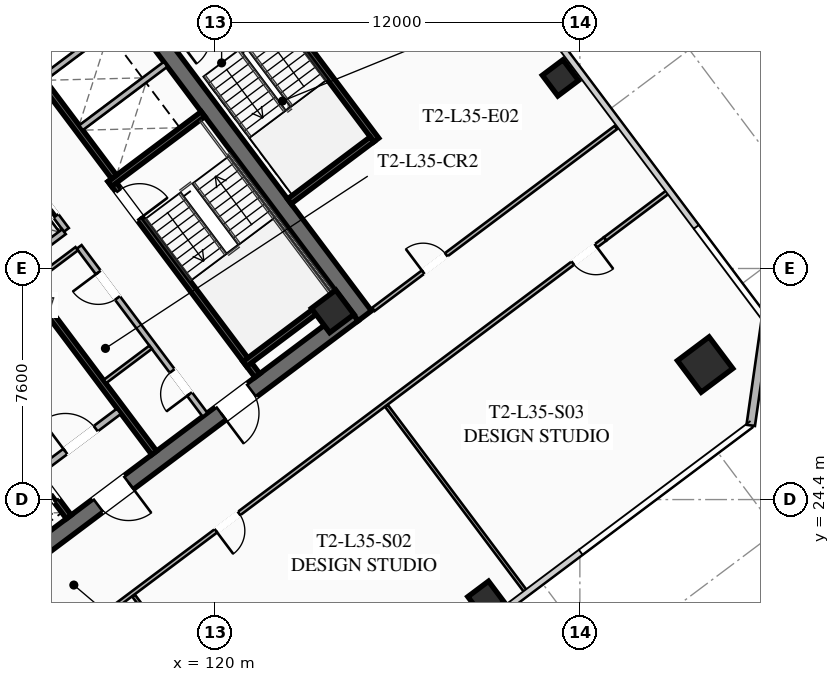
"""IFC4 building model, lengths in metres.
Left out: names, types, materials, properties, quantities, classifications, styles, units other than length and angle.
Written with IfcOpenShell. Run it as: python <this file> out.ifc"""

import sys

from ifc_helpers import new_model, si_unit, direction, frame, frame_2d, origin, origin_2d, place, context, subcontext, project, spatial, rectangle, hollow_rectangle, extrude, element, fill, save


model = new_model("IFC4")
c1 = context("Model", 3, precision=1e-05, world=origin(), true_north=direction((0.0, 1.0)))
c2 = subcontext(c1, "Body", "Model", "MODEL_VIEW")
j1 = project(units=[si_unit("LENGTHUNIT", "METRE"), si_unit("PLANEANGLEUNIT", "RADIAN")], contexts=[c1])
p1 = place(None, origin())
s1 = spatial("IfcSite", under=j1, at=p1, CompositionType="ELEMENT")
p2 = place(p1, origin())
s2 = spatial("IfcBuilding", under=s1, at=p2, CompositionType="ELEMENT")
p3 = place(p2, frame((0.0, 0.0, 132.15)))
s3 = spatial("IfcBuildingStorey", under=s2, at=p3, CompositionType="ELEMENT", Elevation=132.15)
p4 = place(p3, frame((115.564, 42.923, 0.0), z_axis=(0.0, 0.0, 1.0), x_axis=(0.600005007985, -0.799996243986, 0.0)))
e1 = element("IfcWall", 1, at=p4, inside=s3, PredefinedType="SHEAR", context=c2, shape_type="SweptSolid", body=[
    extrude(rectangle(XDim=15.6, YDim=0.55, at=frame_2d((7.8, 0.0))), origin(), (0.0, 0.0, 1.0), 3.55),
])
p5 = place(p3, frame((124.539, 30.498, 0.0), z_axis=(0.0, 0.0, 1.0), x_axis=(-0.799998054672, -0.600002593761, 0.0)))
e2 = element("IfcWall", 2, at=p5, inside=s3, PredefinedType="SHEAR", context=c2, shape_type="SweptSolid", body=[
    extrude(rectangle(XDim=15.06, YDim=0.55, at=frame_2d((7.53, 0.0))), origin(), (0.0, 0.0, 1.0), 3.55),
])
p6 = place(p5, frame((9.23, 0.0, 0.0)))
e3 = element("IfcOpeningElement", 3, at=p6, cuts=e2, PredefinedType="OPENING", context=c2, shape_type="SweptSolid", body=[
    extrude(rectangle(XDim=1.25, YDim=2.25, at=frame_2d((0.625, 1.125))), frame((0.0, 0.285, 0.0), z_axis=(0.0, -1.0, 0.0), x_axis=(1.0, 0.0, 0.0)), (0.0, 0.0, 1.0), 0.57),
])
p7 = place(p5, frame((4.18, 0.0, 0.0)))
e4 = element("IfcOpeningElement", 4, at=p7, cuts=e2, PredefinedType="OPENING", context=c2, shape_type="SweptSolid", body=[
    extrude(rectangle(XDim=1.25, YDim=2.25, at=frame_2d((0.625, 1.125))), frame((0.0, 0.285, 0.0), z_axis=(0.0, -1.0, 0.0), x_axis=(1.0, 0.0, 0.0)), (0.0, 0.0, 1.0), 0.57),
])
p8 = place(p3, frame((103.461, 33.502, 0.0), z_axis=(0.0, 0.0, 1.0), x_axis=(0.799998054672, 0.600002593761, 0.0)))
e5 = element("IfcWall", 5, at=p8, inside=s3, PredefinedType="SHEAR", context=c2, shape_type="SweptSolid", body=[
    extrude(rectangle(XDim=15.06, YDim=0.55, at=frame_2d((7.53, 0.0))), origin(), (0.0, 0.0, 1.0), 3.55),
])
p9 = place(p8, frame((4.58, 0.0, 0.0)))
e6 = element("IfcOpeningElement", 6, at=p9, cuts=e5, PredefinedType="OPENING", context=c2, shape_type="SweptSolid", body=[
    extrude(rectangle(XDim=1.25, YDim=2.25, at=frame_2d((0.625, 1.125))), frame((0.0, 0.285, 0.0), z_axis=(0.0, -1.0, 0.0), x_axis=(1.0, 0.0, 0.0)), (0.0, 0.0, 1.0), 0.57),
])
p10 = place(p8, frame((9.63, 0.0, 0.0)))
e7 = element("IfcOpeningElement", 7, at=p10, cuts=e5, PredefinedType="OPENING", context=c2, shape_type="SweptSolid", body=[
    extrude(rectangle(XDim=1.25, YDim=2.25, at=frame_2d((0.625, 1.125))), frame((0.0, 0.285, 0.0), z_axis=(0.0, -1.0, 0.0), x_axis=(1.0, 0.0, 0.0)), (0.0, 0.0, 1.0), 0.57),
])
p11 = place(p3, frame((123.87, 30.59, 0.0), z_axis=(0.0, 0.0, 1.0), x_axis=(0.799999996291, 0.600000004945, 0.0)))
e8 = element("IfcColumn", 8, at=p11, inside=s3, PredefinedType="COLUMN", context=c2, shape_type="SweptSolid", body=[
    extrude(hollow_rectangle(XDim=1.0, YDim=1.0, WallThickness=0.04, at=origin_2d()), origin(), (0.0, 0.0, 1.0), 3.37),
])
p12 = place(p3, frame((136.12, 28.84, 0.0), z_axis=(0.0, 0.0, 1.0), x_axis=(0.799999996291, 0.600000004945, 0.0)))
e9 = element("IfcColumn", 9, at=p12, inside=s3, PredefinedType="COLUMN", context=c2, shape_type="SweptSolid", body=[
    extrude(hollow_rectangle(XDim=1.3, YDim=1.3, WallThickness=0.05, at=origin_2d()), origin(), (0.0, 0.0, 1.0), 3.37),
])
for number, where, z_axis, x_axis in (
    (10, (128.91, 21.12, 0.0), (0.0, 0.0, 1.0), (0.8, 0.6, 0.0)),
    (11, (131.36, 38.27, 0.0), (0.0, 0.0, 1.0), (0.8, 0.6, 0.0)),
):
    element("IfcColumn", number, at=place(p3, frame(where, z_axis=z_axis, x_axis=x_axis)), inside=s3, PredefinedType="COLUMN", context=c2, shape_type="SweptSolid", body=[
        extrude(hollow_rectangle(XDim=0.85, YDim=0.85, WallThickness=0.035, at=origin_2d()), origin(), (0.0, 0.0, 1.0), 3.37),
    ])
p13 = place(p3, frame((138.12, 30.34, 0.0), z_axis=(0.0, 0.0, 1.0), x_axis=(-0.141421356237, -0.989949493661, 0.0)))
e12 = element("IfcWall", 12, at=p13, inside=s3, PredefinedType="SOLIDWALL", context=c2, shape_type="SweptSolid", body=[
    extrude(rectangle(XDim=3.536, YDim=0.28, at=frame_2d((1.768, 0.0))), origin(), (0.0, 0.0, 1.0), 3.37),
])
p14 = place(p3, frame((116.56, 34.92, 0.0), z_axis=(0.0, 0.0, 1.0), x_axis=(0.59999029481, -0.8000072788, 0.0)))
e13 = element("IfcWall", 13, at=p14, inside=s3, PredefinedType="SHEAR", context=c2, shape_type="SweptSolid", body=[
    extrude(rectangle(XDim=8.05, YDim=0.2, at=frame_2d((4.025, 0.0))), origin(), (0.0, 0.0, 1.0), 3.37),
])
p15 = place(p14, frame((0.45, 0.0, 0.0)))
e14 = element("IfcOpeningElement", 14, at=p15, cuts=e13, PredefinedType="OPENING", context=c2, shape_type="SweptSolid", body=[
    extrude(rectangle(XDim=1.15, YDim=2.2, at=frame_2d((0.575, 1.1))), frame((0.0, 0.11, 0.0), z_axis=(0.0, -1.0, 0.0), x_axis=(1.0, 0.0, 0.0)), (0.0, 0.0, 1.0), 0.22),
])
for number, where, z_axis, x_axis in (
    (15, (116.54, 34.78, 0.0), (0.0, 0.0, 1.0), (0.8, 0.6, 0.0)),
    (16, (120.98, 28.86, 0.0), (0.0, 0.0, 1.0), (0.8, 0.6, 0.0)),
):
    element("IfcWall", number, at=place(p3, frame(where, z_axis=z_axis, x_axis=x_axis)), inside=s3, PredefinedType="SHEAR", context=c2, shape_type="SweptSolid", body=[
        extrude(rectangle(XDim=3.83, YDim=0.2, at=frame_2d((1.915, 0.0))), origin(), (0.0, 0.0, 1.0), 3.37),
    ])
p16 = place(p3, frame((117.998, 25.936, 0.0), z_axis=(0.0, 0.0, 1.0), x_axis=(-0.600002693989, 0.799997979501, 0.0)))
e17 = element("IfcWall", 17, at=p16, inside=s3, PredefinedType="SHEAR", context=c2, shape_type="SweptSolid", body=[
    extrude(rectangle(XDim=14.5, YDim=0.2, at=frame_2d((7.25, 0.0))), origin(), (0.0, 0.0, 1.0), 3.37),
])
p17 = place(p3, frame((114.316, 25.412, 0.0), z_axis=(0.0, 0.0, 1.0), x_axis=(0.800018601094, 0.59997519774, 0.0)))
e18 = element("IfcWall", 18, at=p17, inside=s3, PredefinedType="SOLIDWALL", context=c2, shape_type="SweptSolid", body=[
    extrude(rectangle(XDim=3.15, YDim=0.22, at=frame_2d((1.575, 0.0))), origin(), (0.0, 0.0, 1.0), 2.723),
])
p18 = place(p17, frame((0.95, 0.0, 0.0)))
e19 = element("IfcOpeningElement", 19, at=p18, cuts=e18, PredefinedType="OPENING", context=c2, shape_type="SweptSolid", body=[
    extrude(rectangle(XDim=1.25, YDim=2.25, at=frame_2d((0.625, 1.125))), frame((0.0, 0.12, 0.0), z_axis=(0.0, -1.0, 0.0), x_axis=(1.0, 0.0, 0.0)), (0.0, 0.0, 1.0), 0.24),
])
p19 = place(p3, frame((115.19, 23.83, 0.0), z_axis=(0.0, 0.0, 1.0), x_axis=(-0.599993943644, 0.800004542231, 0.0)))
e20 = element("IfcWall", 20, at=p19, inside=s3, PredefinedType="SHEAR", context=c2, shape_type="SweptSolid", body=[
    extrude(rectangle(XDim=6.45, YDim=0.2, at=frame_2d((3.225, 0.0))), origin(), (0.0, 0.0, 1.0), 3.37),
])
p20 = place(p19, frame((4.875, 0.0, 0.0)))
e21 = element("IfcOpeningElement", 21, at=p20, cuts=e20, PredefinedType="OPENING", context=c2, shape_type="SweptSolid", body=[
    extrude(rectangle(XDim=1.3, YDim=2.25, at=frame_2d((0.65, 1.125))), frame((0.0, 0.11, 0.0), z_axis=(0.0, -1.0, 0.0), x_axis=(1.0, 0.0, 0.0)), (0.0, 0.0, 1.0), 0.22),
])
p21 = place(p19, frame((2.875, 0.0, 0.0)))
e22 = element("IfcOpeningElement", 22, at=p21, cuts=e20, PredefinedType="OPENING", context=c2, shape_type="SweptSolid", body=[
    extrude(rectangle(XDim=1.3, YDim=2.25, at=frame_2d((0.65, 1.125))), frame((0.0, 0.11, 0.0), z_axis=(0.0, -1.0, 0.0), x_axis=(1.0, 0.0, 0.0)), (0.0, 0.0, 1.0), 0.22),
])
p22 = place(p19, frame((0.675, 0.0, 0.0)))
e23 = element("IfcOpeningElement", 23, at=p22, cuts=e20, PredefinedType="OPENING", context=c2, shape_type="SweptSolid", body=[
    extrude(rectangle(XDim=1.3, YDim=2.25, at=frame_2d((0.65, 1.125))), frame((0.0, 0.11, 0.0), z_axis=(0.0, -1.0, 0.0), x_axis=(1.0, 0.0, 0.0)), (0.0, 0.0, 1.0), 0.22),
])
p23 = place(p3, frame((112.81, 40.17, 0.0), z_axis=(0.0, 0.0, 1.0), x_axis=(0.599993943644, -0.800004542231, 0.0)))
e24 = element("IfcWall", 24, at=p23, inside=s3, PredefinedType="SHEAR", context=c2, shape_type="SweptSolid", body=[
    extrude(rectangle(XDim=6.45, YDim=0.2, at=frame_2d((3.225, 0.0))), origin(), (0.0, 0.0, 1.0), 3.37),
])
for number, where, z_axis, x_axis in (
    (25, (115.59, 36.63, 0.0), (0.0, 0.0, 1.0), (0.8, 0.6, 0.0)),
    (26, (114.36, 38.27, 0.0), (0.0, 0.0, 1.0), (0.8, 0.6, 0.0)),
):
    element("IfcWall", number, at=place(p3, frame(where, z_axis=z_axis, x_axis=x_axis)), inside=s3, PredefinedType="SOLIDWALL", context=c2, shape_type="SweptSolid", body=[
        extrude(rectangle(XDim=3.48, YDim=0.2, at=frame_2d((1.74, 0.0))), origin(), (0.0, 0.0, 1.0), 3.37),
    ])
p24 = place(p3, frame((119.67, 27.19, 0.0), z_axis=(0.0, 0.0, 1.0), x_axis=(-0.599988677396, 0.800008491828, 0.0)))
e27 = element("IfcWall", 27, at=p24, inside=s3, PredefinedType="SOLIDWALL", context=c2, shape_type="SweptSolid", body=[
    extrude(rectangle(XDim=6.9, YDim=0.2, at=frame_2d((3.45, 0.0))), origin(), (0.0, 0.0, 1.0), 2.723),
])
p25 = place(p24, frame((0.85, 0.0, 0.0)))
e28 = element("IfcOpeningElement", 28, at=p25, cuts=e27, PredefinedType="OPENING", context=c2, shape_type="SweptSolid", body=[
    extrude(rectangle(XDim=0.95, YDim=2.05, at=frame_2d((0.475, 1.025))), frame((0.0, 0.11, 0.0), z_axis=(0.0, -1.0, 0.0), x_axis=(1.0, 0.0, 0.0)), (0.0, 0.0, 1.0), 0.22),
])
p26 = place(p24, frame((4.8, 0.0, 0.0)))
e29 = element("IfcOpeningElement", 29, at=p26, cuts=e27, PredefinedType="OPENING", context=c2, shape_type="SweptSolid", body=[
    extrude(rectangle(XDim=1.05, YDim=2.2, at=frame_2d((0.525, 1.1))), frame((0.0, 0.11, 0.0), z_axis=(0.0, -1.0, 0.0), x_axis=(1.0, 0.0, 0.0)), (0.0, 0.0, 1.0), 0.22),
])
for number, where, z_axis, x_axis in (
    (30, (113.946, 31.522, 0.0), (0.0, 0.0, 1.0), (0.8, 0.6, 0.0)),
    (31, (116.376, 28.282, 0.0), (0.0, 0.0, 1.0), (0.8, 0.6, 0.0)),
):
    element("IfcWall", number, at=place(p3, frame(where, z_axis=z_axis, x_axis=x_axis)), inside=s3, PredefinedType="PARTITIONING", context=c2, shape_type="SweptSolid", body=[
        extrude(rectangle(XDim=1.88, YDim=0.135, at=frame_2d((0.94, 0.0))), origin(), (0.0, 0.0, 1.0), 2.723),
    ])
p27 = place(p3, frame((115.11, 33.27, 0.0), z_axis=(0.0, 0.0, 1.0), x_axis=(-0.600011322243, 0.799991508192, 0.0)))
e32 = element("IfcWall", 32, at=p27, inside=s3, PredefinedType="SOLIDWALL", context=c2, shape_type="SweptSolid", body=[
    extrude(rectangle(XDim=6.9, YDim=0.2, at=frame_2d((3.45, 0.0))), origin(), (0.0, 0.0, 1.0), 3.37),
])
p28 = place(p27, frame((0.575, 0.0, 0.0)))
e33 = element("IfcOpeningElement", 33, at=p28, cuts=e32, PredefinedType="OPENING", context=c2, shape_type="SweptSolid", body=[
    extrude(rectangle(XDim=1.1, YDim=2.2, at=frame_2d((0.55, 1.1))), frame((0.0, 0.11, 0.0), z_axis=(0.0, -1.0, 0.0), x_axis=(1.0, 0.0, 0.0)), (0.0, 0.0, 1.0), 0.22),
])
p29 = place(p27, frame((2.825, 0.0, 0.0)))
e34 = element("IfcOpeningElement", 34, at=p29, cuts=e32, PredefinedType="OPENING", context=c2, shape_type="SweptSolid", body=[
    extrude(rectangle(XDim=1.1, YDim=2.2, at=frame_2d((0.55, 1.1))), frame((0.0, 0.11, 0.0), z_axis=(0.0, -1.0, 0.0), x_axis=(1.0, 0.0, 0.0)), (0.0, 0.0, 1.0), 0.22),
])
p30 = place(p27, frame((5.075, 0.0, 0.0)))
e35 = element("IfcOpeningElement", 35, at=p30, cuts=e32, PredefinedType="OPENING", context=c2, shape_type="SweptSolid", body=[
    extrude(rectangle(XDim=1.1, YDim=2.2, at=frame_2d((0.55, 1.1))), frame((0.0, 0.11, 0.0), z_axis=(0.0, -1.0, 0.0), x_axis=(1.0, 0.0, 0.0)), (0.0, 0.0, 1.0), 0.22),
])
p31 = place(p3, frame((113.526, 32.082, 0.0), z_axis=(0.0, 0.0, 1.0), x_axis=(0.800046745961, 0.599937666993, 0.0)))
e36 = element("IfcWall", 36, at=p31, inside=s3, PredefinedType="SOLIDWALL", context=c2, shape_type="SweptSolid", body=[
    extrude(rectangle(XDim=1.88, YDim=0.2, at=frame_2d((0.94, 0.0))), origin(), (0.0, 0.0, 1.0), 3.37),
])
p32 = place(p3, frame((125.304, 36.228, 0.0), z_axis=(0.0, 0.0, 1.0), x_axis=(-0.59998851072, 0.800008616831, 0.0)))
e37 = element("IfcWall", 37, at=p32, inside=s3, PredefinedType="SHEAR", context=c2, shape_type="SweptSolid", body=[
    extrude(rectangle(XDim=6.8, YDim=0.2, at=frame_2d((3.4, 0.0))), origin(), (0.0, 0.0, 1.0), 3.37),
])
p33 = place(p3, frame((122.444, 34.208, 0.0), z_axis=(0.0, 0.0, 1.0), x_axis=(0.79999138319, 0.600011488909, 0.0)))
e38 = element("IfcWall", 38, at=p33, inside=s3, PredefinedType="SHEAR", context=c2, shape_type="SweptSolid", body=[
    extrude(rectangle(XDim=3.4, YDim=0.2, at=frame_2d((1.7, 0.0))), origin(), (0.0, 0.0, 1.0), 3.37),
])
p34 = place(p3, frame((95.87, 30.09, 0.0), z_axis=(0.0, 0.0, 1.0), x_axis=(0.799997191971, 0.600003744021, 0.0)))
e39 = element("IfcWall", 39, at=p34, inside=s3, PredefinedType="PARTITIONING", context=c2, shape_type="SweptSolid", body=[
    extrude(rectangle(XDim=31.3, YDim=0.135, at=frame_2d((15.65, 0.0))), origin(), (0.0, 0.0, 1.0), 2.723),
])
p35 = place(p34, frame((0.3, 0.0, 0.0)))
e40 = element("IfcOpeningElement", 40, at=p35, cuts=e39, PredefinedType="OPENING", context=c2, shape_type="SweptSolid", body=[
    extrude(rectangle(XDim=0.95, YDim=2.05, at=frame_2d((0.475, 1.025))), frame((0.0, 0.077, 0.0), z_axis=(0.0, -1.0, 0.0), x_axis=(1.0, 0.0, 0.0)), (0.0, 0.0, 1.0), 0.155),
])
p36 = place(p34, frame((11.202, 0.0, 0.0)))
e41 = element("IfcOpeningElement", 41, at=p36, cuts=e39, PredefinedType="OPENING", context=c2, shape_type="SweptSolid", body=[
    extrude(rectangle(XDim=0.95, YDim=2.05, at=frame_2d((0.475, 1.025))), frame((0.0, 0.077, 0.0), z_axis=(0.0, -1.0, 0.0), x_axis=(1.0, 0.0, 0.0)), (0.0, 0.0, 1.0), 0.155),
])
p37 = place(p34, frame((15.474, 0.0, 0.0)))
e42 = element("IfcOpeningElement", 42, at=p37, cuts=e39, PredefinedType="OPENING", context=c2, shape_type="SweptSolid", body=[
    extrude(rectangle(XDim=0.95, YDim=2.05, at=frame_2d((0.475, 1.025))), frame((0.0, 0.077, 0.0), z_axis=(0.0, -1.0, 0.0), x_axis=(1.0, 0.0, 0.0)), (0.0, 0.0, 1.0), 0.155),
])
p38 = place(p34, frame((30.05, 0.0, 0.0)))
e43 = element("IfcOpeningElement", 43, at=p38, cuts=e39, PredefinedType="OPENING", context=c2, shape_type="SweptSolid", body=[
    extrude(rectangle(XDim=0.95, YDim=2.05, at=frame_2d((0.475, 1.025))), frame((0.0, 0.077, 0.0), z_axis=(0.0, -1.0, 0.0), x_axis=(1.0, 0.0, 0.0)), (0.0, 0.0, 1.0), 0.155),
])
p39 = place(p3, frame((132.832, 32.974, 0.0), z_axis=(0.0, 0.0, 1.0), x_axis=(-0.8, -0.6, 0.0)))
e44 = element("IfcWall", 44, at=p39, inside=s3, PredefinedType="PARTITIONING", context=c2, shape_type="SweptSolid", body=[
    extrude(rectangle(XDim=31.3, YDim=0.135, at=frame_2d((15.65, 0.0))), origin(), (0.0, 0.0, 1.0), 2.723),
])
p40 = place(p39, frame((29.97, 0.0, 0.0)))
e45 = element("IfcOpeningElement", 45, at=p40, cuts=e44, PredefinedType="OPENING", context=c2, shape_type="SweptSolid", body=[
    extrude(rectangle(XDim=0.95, YDim=2.05, at=frame_2d((0.475, 1.025))), frame((0.0, 0.077, 0.0), z_axis=(0.0, -1.0, 0.0), x_axis=(1.0, 0.0, 0.0)), (0.0, 0.0, 1.0), 0.155),
])
p41 = place(p39, frame((15.053, 0.0, 0.0)))
e46 = element("IfcOpeningElement", 46, at=p41, cuts=e44, PredefinedType="OPENING", context=c2, shape_type="SweptSolid", body=[
    extrude(rectangle(XDim=0.95, YDim=2.05, at=frame_2d((0.475, 1.025))), frame((0.0, 0.077, 0.0), z_axis=(0.0, -1.0, 0.0), x_axis=(1.0, 0.0, 0.0)), (0.0, 0.0, 1.0), 0.155),
])
p42 = place(p39, frame((0.38, 0.0, 0.0)))
e47 = element("IfcOpeningElement", 47, at=p42, cuts=e44, PredefinedType="OPENING", context=c2, shape_type="SweptSolid", body=[
    extrude(rectangle(XDim=0.95, YDim=2.05, at=frame_2d((0.475, 1.025))), frame((0.0, 0.077, 0.0), z_axis=(0.0, -1.0, 0.0), x_axis=(1.0, 0.0, 0.0)), (0.0, 0.0, 1.0), 0.155),
])
p43 = place(p3, frame((132.832, 32.974, 0.0), z_axis=(0.0, 0.0, 1.0), x_axis=(0.80002227902, 0.599970293491, 0.0)))
e48 = element("IfcWall", 48, at=p43, inside=s3, PredefinedType="PARTITIONING", context=c2, shape_type="SweptSolid", body=[
    extrude(rectangle(XDim=2.63, YDim=0.135, at=frame_2d((1.315, 0.0))), origin(), (0.0, 0.0, 1.0), 2.723),
])
p44 = place(p3, frame((121.928, 15.096, 0.0), z_axis=(0.0, 0.0, 1.0), x_axis=(-0.5999898274, 0.800007629349, 0.0)))
e49 = element("IfcWall", 49, at=p44, inside=s3, PredefinedType="PARTITIONING", context=c2, shape_type="SweptSolid", body=[
    extrude(rectangle(XDim=7.68, YDim=0.11, at=frame_2d((3.84, 0.0))), origin(), (0.0, 0.0, 1.0), 2.723),
])
p45 = place(p3, frame((130.248, 21.336, 0.0), z_axis=(0.0, 0.0, 1.0), x_axis=(-0.600010172309, 0.799992370667, 0.0)))
e50 = element("IfcWall", 50, at=p45, inside=s3, PredefinedType="PARTITIONING", context=c2, shape_type="SweptSolid", body=[
    extrude(rectangle(XDim=7.68, YDim=0.11, at=frame_2d((3.84, 0.0))), origin(), (0.0, 0.0, 1.0), 2.723),
])
p46 = place(p3, frame((125.208, 30.656, 0.0), z_axis=(0.0, 0.0, 1.0), x_axis=(0.800005876956, 0.599992163979, 0.0)))
e51 = element("IfcWall", 51, at=p46, inside=s3, PredefinedType="PARTITIONING", context=c2, shape_type="SweptSolid", body=[
    extrude(rectangle(XDim=9.97, YDim=0.135, at=frame_2d((4.985, 0.0))), origin(), (0.0, 0.0, 1.0), 2.723),
])
p47 = place(p46, frame((2.045, 0.0, 0.0)))
e52 = element("IfcOpeningElement", 52, at=p47, cuts=e51, PredefinedType="OPENING", context=c2, shape_type="SweptSolid", body=[
    extrude(rectangle(XDim=0.95, YDim=2.05, at=frame_2d((0.475, 1.025))), frame((0.0, 0.077, 0.0), z_axis=(0.0, -1.0, 0.0), x_axis=(1.0, 0.0, 0.0)), (0.0, 0.0, 1.0), 0.155),
])
p48 = place(p6, origin())
e53 = element("IfcDoor", 53, at=p48, inside=s3, OperationType="SINGLE_SWING_LEFT", PredefinedType="DOOR", context=c2, shape_type="SweptSolid", body=[
    extrude(rectangle(XDim=1.25, YDim=2.25, at=frame_2d((0.625, 1.125))), frame((0.0, 0.025, 0.0), z_axis=(0.0, -1.0, 0.0), x_axis=(1.0, 0.0, 0.0)), (0.0, 0.0, 1.0), 0.05),
])
fill(e3, e53)
p49 = place(p7, origin())
e54 = element("IfcDoor", 54, at=p49, inside=s3, OperationType="SINGLE_SWING_RIGHT", PredefinedType="DOOR", context=c2, shape_type="SweptSolid", body=[
    extrude(rectangle(XDim=1.25, YDim=2.25, at=frame_2d((0.625, 1.125))), frame((0.0, 0.025, 0.0), z_axis=(0.0, -1.0, 0.0), x_axis=(1.0, 0.0, 0.0)), (0.0, 0.0, 1.0), 0.05),
])
fill(e4, e54)
p50 = place(p15, origin())
e55 = element("IfcDoor", 55, at=p50, inside=s3, OperationType="SINGLE_SWING_RIGHT", PredefinedType="DOOR", context=c2, shape_type="SweptSolid", body=[
    extrude(rectangle(XDim=1.15, YDim=2.2, at=frame_2d((0.575, 1.1))), frame((0.0, 0.025, 0.0), z_axis=(0.0, -1.0, 0.0), x_axis=(1.0, 0.0, 0.0)), (0.0, 0.0, 1.0), 0.05),
])
fill(e14, e55)
p51 = place(p18, origin())
e56 = element("IfcDoor", 56, at=p51, inside=s3, OperationType="SINGLE_SWING_LEFT", PredefinedType="DOOR", context=c2, shape_type="SweptSolid", body=[
    extrude(rectangle(XDim=1.25, YDim=2.25, at=frame_2d((0.625, 1.125))), frame((0.0, 0.025, 0.0), z_axis=(0.0, -1.0, 0.0), x_axis=(1.0, 0.0, 0.0)), (0.0, 0.0, 1.0), 0.05),
])
fill(e19, e56)
p52 = place(p25, origin())
e57 = element("IfcDoor", 57, at=p52, inside=s3, OperationType="SINGLE_SWING_LEFT", PredefinedType="DOOR", context=c2, shape_type="SweptSolid", body=[
    extrude(rectangle(XDim=0.95, YDim=2.05, at=frame_2d((0.475, 1.025))), frame((0.0, 0.025, 0.0), z_axis=(0.0, -1.0, 0.0), x_axis=(1.0, 0.0, 0.0)), (0.0, 0.0, 1.0), 0.05),
])
fill(e28, e57)
p53 = place(p26, origin())
e58 = element("IfcDoor", 58, at=p53, inside=s3, OperationType="SINGLE_SWING_RIGHT", PredefinedType="DOOR", context=c2, shape_type="SweptSolid", body=[
    extrude(rectangle(XDim=1.05, YDim=2.2, at=frame_2d((0.525, 1.1))), frame((0.0, 0.025, 0.0), z_axis=(0.0, -1.0, 0.0), x_axis=(1.0, 0.0, 0.0)), (0.0, 0.0, 1.0), 0.05),
])
fill(e29, e58)
p54 = place(p41, origin())
e59 = element("IfcDoor", 59, at=p54, inside=s3, OperationType="SINGLE_SWING_RIGHT", PredefinedType="DOOR", context=c2, shape_type="SweptSolid", body=[
    extrude(rectangle(XDim=0.95, YDim=2.05, at=frame_2d((0.475, 1.025))), frame((0.0, 0.025, 0.0), z_axis=(0.0, -1.0, 0.0), x_axis=(1.0, 0.0, 0.0)), (0.0, 0.0, 1.0), 0.05),
])
fill(e46, e59)
p55 = place(p42, origin())
e60 = element("IfcDoor", 60, at=p55, inside=s3, OperationType="SINGLE_SWING_LEFT", PredefinedType="DOOR", context=c2, shape_type="SweptSolid", body=[
    extrude(rectangle(XDim=0.95, YDim=2.05, at=frame_2d((0.475, 1.025))), frame((0.0, 0.025, 0.0), z_axis=(0.0, -1.0, 0.0), x_axis=(1.0, 0.0, 0.0)), (0.0, 0.0, 1.0), 0.05),
])
fill(e47, e60)
p56 = place(p47, origin())
e61 = element("IfcDoor", 61, at=p56, inside=s3, OperationType="SINGLE_SWING_LEFT", PredefinedType="DOOR", context=c2, shape_type="SweptSolid", body=[
    extrude(rectangle(XDim=0.95, YDim=2.05, at=frame_2d((0.475, 1.025))), frame((0.0, 0.025, 0.0), z_axis=(0.0, -1.0, 0.0), x_axis=(1.0, 0.0, 0.0)), (0.0, 0.0, 1.0), 0.05),
])
fill(e52, e61)
p57 = place(p22, origin())
e62 = element("IfcDoor", 62, at=p57, inside=s3, OperationType="SLIDING_TO_LEFT", PredefinedType="DOOR", context=c2, shape_type="SweptSolid", body=[
    extrude(rectangle(XDim=1.3, YDim=2.25, at=frame_2d((0.65, 1.125))), frame((0.0, 0.025, 0.0), z_axis=(0.0, -1.0, 0.0), x_axis=(1.0, 0.0, 0.0)), (0.0, 0.0, 1.0), 0.05),
])
fill(e23, e62)
p58 = place(p28, origin())
e63 = element("IfcDoor", 63, at=p58, inside=s3, OperationType="SLIDING_TO_LEFT", PredefinedType="DOOR", context=c2, shape_type="SweptSolid", body=[
    extrude(rectangle(XDim=1.1, YDim=2.2, at=frame_2d((0.55, 1.1))), frame((0.0, 0.025, 0.0), z_axis=(0.0, -1.0, 0.0), x_axis=(1.0, 0.0, 0.0)), (0.0, 0.0, 1.0), 0.05),
])
fill(e33, e63)
save(model, sys.argv[1])
